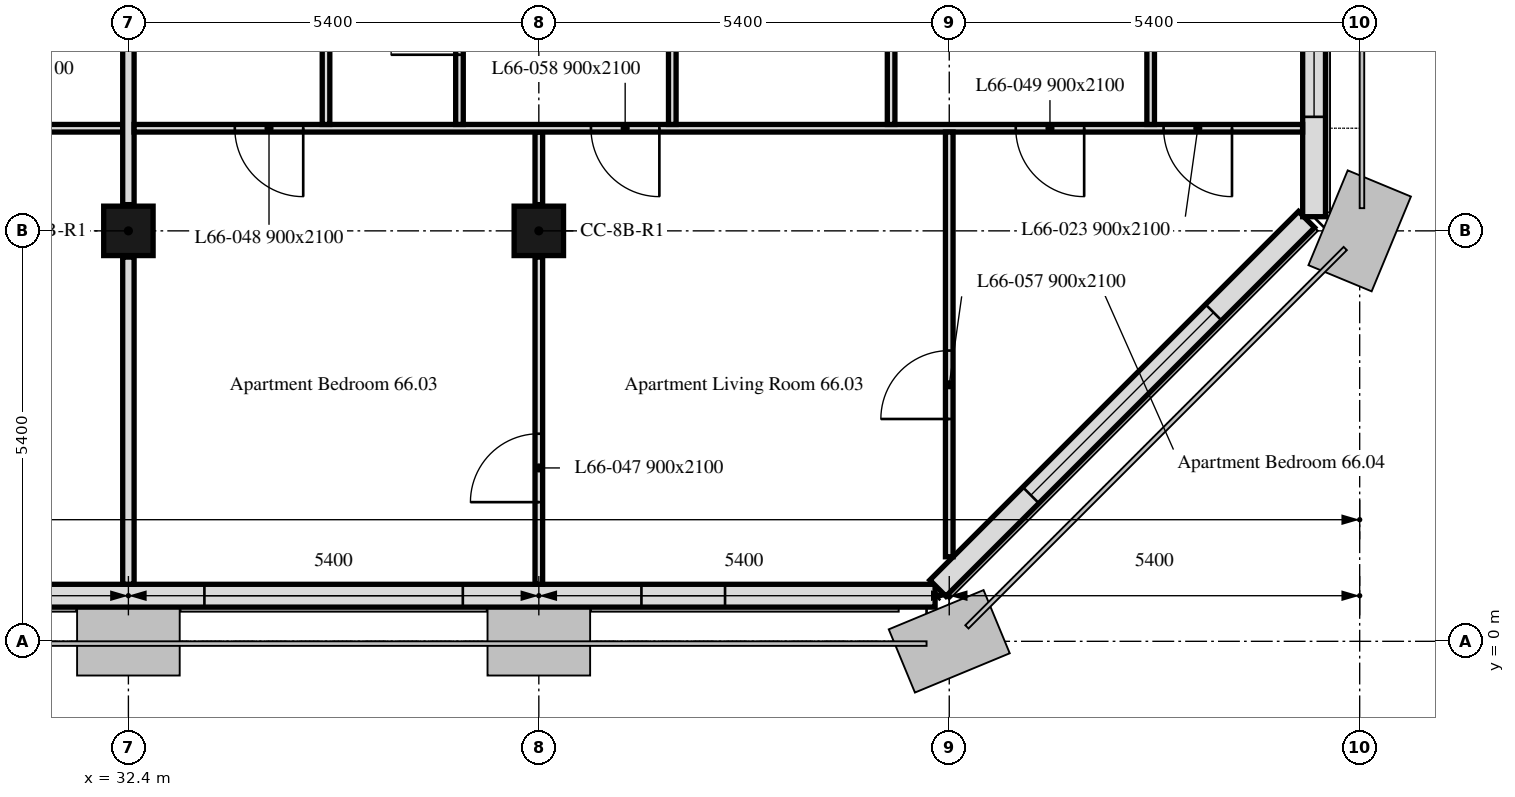
"""IFC4 building model, lengths in metres.
Left out: names, types, materials, properties, quantities, classifications, styles, units other than length and angle.
Written with IfcOpenShell. Run it as: python <this file> out.ifc"""

import sys

from ifc_helpers import new_model, si_unit, direction, frame, frame_2d, origin, origin_2d, place, context, subcontext, project, spatial, rectangle, extrude, element, fill, save


model = new_model("IFC4")
c1 = context("Model", 3, precision=1e-05, world=origin(), true_north=direction((0.0, 1.0)))
c2 = subcontext(c1, "Body", "Model", "MODEL_VIEW")
j1 = project(units=[si_unit("LENGTHUNIT", "METRE"), si_unit("PLANEANGLEUNIT", "RADIAN")], contexts=[c1])
p1 = place(None, origin())
s1 = spatial("IfcSite", under=j1, at=p1, CompositionType="ELEMENT")
p2 = place(p1, origin())
s2 = spatial("IfcBuilding", under=s1, at=p2, CompositionType="ELEMENT")
p3 = place(p2, frame((0.0, 0.0, 271.9)))
s3 = spatial("IfcBuildingStorey", under=s2, at=p3, CompositionType="ELEMENT", Elevation=271.9)
for number, where, z_axis, x_axis in (
    (1, (32.4, 5.4, 0.0), (0.0, 0.0, 1.0), (1.0, 0.0, 0.0)),
    (2, (37.8, 5.4, 0.0), (0.0, 0.0, 1.0), (1.0, 0.0, 0.0)),
):
    element("IfcColumn", number, at=place(p3, frame(where, z_axis=z_axis, x_axis=x_axis)), inside=s3, PredefinedType="COLUMN", context=c2, shape_type="SweptSolid", body=[
        extrude(rectangle(XDim=0.65, YDim=0.65, at=origin_2d()), origin(), (0.0, 0.0, 1.0), 3.0),
    ])
p4 = place(p3, frame((10.986, 0.6, 0.0), z_axis=(0.0, 0.0, 1.0), x_axis=(1.0, 0.0, 0.0)))
e3 = element("IfcWall", 3, at=p4, inside=s3, PredefinedType="SOLIDWALL", context=c2, shape_type="SweptSolid", body=[
    extrude(rectangle(XDim=32.027, YDim=0.3, at=frame_2d((16.014, 0.0))), origin(), (0.0, 0.0, 1.0), 3.0),
])
p5 = place(p4, frame((0.814, 0.0, 0.9)))
e4 = element("IfcOpeningElement", 4, at=p5, cuts=e3, PredefinedType="OPENING", context=c2, shape_type="SweptSolid", body=[
    extrude(rectangle(XDim=3.4, YDim=1.7, at=frame_2d((1.7, 0.85))), frame((0.0, 0.16, 0.0), z_axis=(0.0, -1.0, 0.0), x_axis=(1.0, 0.0, 0.0)), (0.0, 0.0, 1.0), 0.32),
])
p6 = place(p4, frame((6.564, 0.0, 0.9)))
e5 = element("IfcOpeningElement", 5, at=p6, cuts=e3, PredefinedType="OPENING", context=c2, shape_type="SweptSolid", body=[
    extrude(rectangle(XDim=1.1, YDim=1.7, at=frame_2d((0.55, 0.85))), frame((0.0, 0.16, 0.0), z_axis=(0.0, -1.0, 0.0), x_axis=(1.0, 0.0, 0.0)), (0.0, 0.0, 1.0), 0.32),
])
p7 = place(p4, frame((11.614, 0.0, 0.9)))
e6 = element("IfcOpeningElement", 6, at=p7, cuts=e3, PredefinedType="OPENING", context=c2, shape_type="SweptSolid", body=[
    extrude(rectangle(XDim=3.4, YDim=1.7, at=frame_2d((1.7, 0.85))), frame((0.0, 0.16, 0.0), z_axis=(0.0, -1.0, 0.0), x_axis=(1.0, 0.0, 0.0)), (0.0, 0.0, 1.0), 0.32),
])
p8 = place(p4, frame((17.364, 0.0, 0.9)))
e7 = element("IfcOpeningElement", 7, at=p8, cuts=e3, PredefinedType="OPENING", context=c2, shape_type="SweptSolid", body=[
    extrude(rectangle(XDim=1.1, YDim=1.7, at=frame_2d((0.55, 0.85))), frame((0.0, 0.16, 0.0), z_axis=(0.0, -1.0, 0.0), x_axis=(1.0, 0.0, 0.0)), (0.0, 0.0, 1.0), 0.32),
])
p9 = place(p4, frame((22.414, 0.0, 0.9)))
e8 = element("IfcOpeningElement", 8, at=p9, cuts=e3, PredefinedType="OPENING", context=c2, shape_type="SweptSolid", body=[
    extrude(rectangle(XDim=3.4, YDim=1.7, at=frame_2d((1.7, 0.85))), frame((0.0, 0.16, 0.0), z_axis=(0.0, -1.0, 0.0), x_axis=(1.0, 0.0, 0.0)), (0.0, 0.0, 1.0), 0.32),
])
p10 = place(p4, frame((28.164, 0.0, 0.9)))
e9 = element("IfcOpeningElement", 9, at=p10, cuts=e3, PredefinedType="OPENING", context=c2, shape_type="SweptSolid", body=[
    extrude(rectangle(XDim=1.1, YDim=1.7, at=frame_2d((0.55, 0.85))), frame((0.0, 0.16, 0.0), z_axis=(0.0, -1.0, 0.0), x_axis=(1.0, 0.0, 0.0)), (0.0, 0.0, 1.0), 0.32),
])
p11 = place(p3, frame((43.051, 0.699, 0.0), z_axis=(0.0, 0.0, 1.0), x_axis=(0.707106781187, 0.707106781187, 0.0)))
e10 = element("IfcWall", 10, at=p11, inside=s3, PredefinedType="SOLIDWALL", context=c2, shape_type="SweptSolid", body=[
    extrude(rectangle(XDim=6.86, YDim=0.3, at=frame_2d((3.43, 0.0))), origin(), (0.0, 0.0, 1.0), 3.0),
])
p12 = place(p11, frame((1.73, 0.0, 0.9)))
e11 = element("IfcOpeningElement", 11, at=p12, cuts=e10, PredefinedType="OPENING", context=c2, shape_type="SweptSolid", body=[
    extrude(rectangle(XDim=3.4, YDim=1.7, at=frame_2d((1.7, 0.85))), frame((0.0, 0.16, 0.0), z_axis=(0.0, -1.0, 0.0), x_axis=(1.0, 0.0, 0.0)), (0.0, 0.0, 1.0), 0.32),
])
p13 = place(p3, frame((48.0, 5.586, 0.0), z_axis=(0.0, 0.0, 1.0), x_axis=(0.0, 1.0, 0.0)))
e12 = element("IfcWall", 12, at=p13, inside=s3, PredefinedType="SOLIDWALL", context=c2, shape_type="SweptSolid", body=[
    extrude(rectangle(XDim=32.027, YDim=0.3, at=frame_2d((16.014, 0.0))), origin(), (0.0, 0.0, 1.0), 3.0),
])
p14 = place(p13, frame((1.314, 0.0, 0.9)))
e13 = element("IfcOpeningElement", 13, at=p14, cuts=e12, PredefinedType="OPENING", context=c2, shape_type="SweptSolid", body=[
    extrude(rectangle(XDim=1.1, YDim=1.7, at=frame_2d((0.55, 0.85))), frame((0.0, 0.16, 0.0), z_axis=(0.0, -1.0, 0.0), x_axis=(1.0, 0.0, 0.0)), (0.0, 0.0, 1.0), 0.32),
])
p15 = place(p13, frame((2.764, 0.0, 0.9)))
e14 = element("IfcOpeningElement", 14, at=p15, cuts=e12, PredefinedType="OPENING", context=c2, shape_type="SweptSolid", body=[
    extrude(rectangle(XDim=1.1, YDim=1.7, at=frame_2d((0.55, 0.85))), frame((0.0, 0.16, 0.0), z_axis=(0.0, -1.0, 0.0), x_axis=(1.0, 0.0, 0.0)), (0.0, 0.0, 1.0), 0.32),
])
p16 = place(p13, frame((6.564, 0.0, 0.9)))
e15 = element("IfcOpeningElement", 15, at=p16, cuts=e12, PredefinedType="OPENING", context=c2, shape_type="SweptSolid", body=[
    extrude(rectangle(XDim=1.1, YDim=1.7, at=frame_2d((0.55, 0.85))), frame((0.0, 0.16, 0.0), z_axis=(0.0, -1.0, 0.0), x_axis=(1.0, 0.0, 0.0)), (0.0, 0.0, 1.0), 0.32),
])
p17 = place(p13, frame((8.514, 0.0, 0.9)))
e16 = element("IfcOpeningElement", 16, at=p17, cuts=e12, PredefinedType="OPENING", context=c2, shape_type="SweptSolid", body=[
    extrude(rectangle(XDim=1.1, YDim=1.7, at=frame_2d((0.55, 0.85))), frame((0.0, 0.16, 0.0), z_axis=(0.0, -1.0, 0.0), x_axis=(1.0, 0.0, 0.0)), (0.0, 0.0, 1.0), 0.32),
])
p18 = place(p13, frame((11.614, 0.0, 0.9)))
e17 = element("IfcOpeningElement", 17, at=p18, cuts=e12, PredefinedType="OPENING", context=c2, shape_type="SweptSolid", body=[
    extrude(rectangle(XDim=3.4, YDim=1.7, at=frame_2d((1.7, 0.85))), frame((0.0, 0.16, 0.0), z_axis=(0.0, -1.0, 0.0), x_axis=(1.0, 0.0, 0.0)), (0.0, 0.0, 1.0), 0.32),
])
p19 = place(p13, frame((17.364, 0.0, 0.9)))
e18 = element("IfcOpeningElement", 18, at=p19, cuts=e12, PredefinedType="OPENING", context=c2, shape_type="SweptSolid", body=[
    extrude(rectangle(XDim=1.1, YDim=1.7, at=frame_2d((0.55, 0.85))), frame((0.0, 0.16, 0.0), z_axis=(0.0, -1.0, 0.0), x_axis=(1.0, 0.0, 0.0)), (0.0, 0.0, 1.0), 0.32),
])
p20 = place(p13, frame((18.964, 0.0, 0.9)))
e19 = element("IfcOpeningElement", 19, at=p20, cuts=e12, PredefinedType="OPENING", context=c2, shape_type="SweptSolid", body=[
    extrude(rectangle(XDim=1.1, YDim=1.7, at=frame_2d((0.55, 0.85))), frame((0.0, 0.16, 0.0), z_axis=(0.0, -1.0, 0.0), x_axis=(1.0, 0.0, 0.0)), (0.0, 0.0, 1.0), 0.32),
])
p21 = place(p13, frame((22.414, 0.0, 0.9)))
e20 = element("IfcOpeningElement", 20, at=p21, cuts=e12, PredefinedType="OPENING", context=c2, shape_type="SweptSolid", body=[
    extrude(rectangle(XDim=3.4, YDim=1.7, at=frame_2d((1.7, 0.85))), frame((0.0, 0.16, 0.0), z_axis=(0.0, -1.0, 0.0), x_axis=(1.0, 0.0, 0.0)), (0.0, 0.0, 1.0), 0.32),
])
p22 = place(p13, frame((28.239, 0.0, 0.9)))
e21 = element("IfcOpeningElement", 21, at=p22, cuts=e12, PredefinedType="OPENING", context=c2, shape_type="SweptSolid", body=[
    extrude(rectangle(XDim=0.65, YDim=1.7, at=frame_2d((0.325, 0.85))), frame((0.0, 0.16, 0.0), z_axis=(0.0, -1.0, 0.0), x_axis=(1.0, 0.0, 0.0)), (0.0, 0.0, 1.0), 0.32),
])
p23 = place(p13, frame((29.764, 0.0, 0.9)))
e22 = element("IfcOpeningElement", 22, at=p23, cuts=e12, PredefinedType="OPENING", context=c2, shape_type="SweptSolid", body=[
    extrude(rectangle(XDim=1.1, YDim=1.7, at=frame_2d((0.55, 0.85))), frame((0.0, 0.16, 0.0), z_axis=(0.0, -1.0, 0.0), x_axis=(1.0, 0.0, 0.0)), (0.0, 0.0, 1.0), 0.32),
])
p24 = place(p3, frame((32.4, 0.751, 0.0), z_axis=(0.0, 0.0, 1.0), x_axis=(0.0, 1.0, 0.0)))
e23 = element("IfcWall", 23, at=p24, inside=s3, PredefinedType="PARTITIONING", context=c2, shape_type="SweptSolid", body=[
    extrude(rectangle(XDim=4.304, YDim=0.15, at=frame_2d((2.152, 0.0))), origin(), (0.0, 0.0, 1.0), 2.4),
])
p25 = place(p3, frame((32.325, 6.75, 0.0), z_axis=(0.0, 0.0, 1.0), x_axis=(-1.0, 0.0, 0.0)))
e24 = element("IfcWall", 24, at=p25, inside=s3, PredefinedType="PARTITIONING", context=c2, shape_type="SweptSolid", body=[
    extrude(rectangle(XDim=5.355, YDim=0.1, at=frame_2d((2.677, 0.0))), origin(), (0.0, 0.0, 1.0), 3.0),
])
p26 = place(p25, frame((1.949, 0.0, 0.0)))
e25 = element("IfcOpeningElement", 25, at=p26, cuts=e24, PredefinedType="OPENING", context=c2, shape_type="SweptSolid", body=[
    extrude(rectangle(XDim=0.9, YDim=2.1, at=frame_2d((0.45, 1.05))), frame((0.0, 0.05, 0.0), z_axis=(0.0, -1.0, 0.0), x_axis=(1.0, 0.0, 0.0)), (0.0, 0.0, 1.0), 0.1),
])
p27 = place(p3, frame((32.4, 5.745, 0.0), z_axis=(0.0, 0.0, 1.0), x_axis=(0.0, 1.0, 0.0)))
e26 = element("IfcWall", 26, at=p27, inside=s3, PredefinedType="PARTITIONING", context=c2, shape_type="SweptSolid", body=[
    extrude(rectangle(XDim=4.71, YDim=0.15, at=frame_2d((2.355, 0.0))), origin(), (0.0, 0.0, 1.0), 2.4),
])
p28 = place(p3, frame((37.8, 0.751, 0.0), z_axis=(0.0, 0.0, 1.0), x_axis=(0.0, 1.0, 0.0)))
e27 = element("IfcWall", 27, at=p28, inside=s3, PredefinedType="PARTITIONING", context=c2, shape_type="SweptSolid", body=[
    extrude(rectangle(XDim=4.304, YDim=0.1, at=frame_2d((2.152, 0.0))), origin(), (0.0, 0.0, 1.0), 2.4),
])
p29 = place(p28, frame((1.08, 0.0, 0.0)))
e28 = element("IfcOpeningElement", 28, at=p29, cuts=e27, PredefinedType="OPENING", context=c2, shape_type="SweptSolid", body=[
    extrude(rectangle(XDim=0.9, YDim=2.1, at=frame_2d((0.45, 1.05))), frame((0.0, 0.05, 0.0), z_axis=(0.0, -1.0, 0.0), x_axis=(1.0, 0.0, 0.0)), (0.0, 0.0, 1.0), 0.1),
])
p30 = place(p3, frame((37.8, 5.745, 0.0), z_axis=(0.0, 0.0, 1.0), x_axis=(0.0, 1.0, 0.0)))
e29 = element("IfcWall", 29, at=p30, inside=s3, PredefinedType="PARTITIONING", context=c2, shape_type="SweptSolid", body=[
    extrude(rectangle(XDim=0.955, YDim=0.1, at=frame_2d((0.478, 0.0))), origin(), (0.0, 0.0, 1.0), 2.4),
])
p31 = place(p3, frame((47.849, 6.75, 0.0), z_axis=(0.0, 0.0, 1.0), x_axis=(-1.0, 0.0, 0.0)))
e30 = element("IfcWall", 30, at=p31, inside=s3, PredefinedType="PARTITIONING", context=c2, shape_type="SweptSolid", body=[
    extrude(rectangle(XDim=15.374, YDim=0.1, at=frame_2d((7.687, 0.0))), origin(), (0.0, 0.0, 1.0), 2.4),
])
p32 = place(p31, frame((0.929, 0.0, 0.0)))
e31 = element("IfcOpeningElement", 31, at=p32, cuts=e30, PredefinedType="OPENING", context=c2, shape_type="SweptSolid", body=[
    extrude(rectangle(XDim=0.9, YDim=2.1, at=frame_2d((0.45, 1.05))), frame((0.0, 0.05, 0.0), z_axis=(0.0, -1.0, 0.0), x_axis=(1.0, 0.0, 0.0)), (0.0, 0.0, 1.0), 0.1),
])
p33 = place(p31, frame((13.149, 0.0, 0.0)))
e32 = element("IfcOpeningElement", 32, at=p33, cuts=e30, PredefinedType="OPENING", context=c2, shape_type="SweptSolid", body=[
    extrude(rectangle(XDim=0.9, YDim=2.1, at=frame_2d((0.45, 1.05))), frame((0.0, 0.05, 0.0), z_axis=(0.0, -1.0, 0.0), x_axis=(1.0, 0.0, 0.0)), (0.0, 0.0, 1.0), 0.1),
])
p34 = place(p31, frame((2.874, 0.0, 0.0)))
e33 = element("IfcOpeningElement", 33, at=p34, cuts=e30, PredefinedType="OPENING", context=c2, shape_type="SweptSolid", body=[
    extrude(rectangle(XDim=0.9, YDim=2.1, at=frame_2d((0.45, 1.05))), frame((0.0, 0.05, 0.0), z_axis=(0.0, -1.0, 0.0), x_axis=(1.0, 0.0, 0.0)), (0.0, 0.0, 1.0), 0.1),
])
p35 = place(p31, frame((8.463, 0.0, 0.0)))
e34 = element("IfcOpeningElement", 34, at=p35, cuts=e30, PredefinedType="OPENING", context=c2, shape_type="SweptSolid", body=[
    extrude(rectangle(XDim=0.9, YDim=2.1, at=frame_2d((0.45, 1.05))), frame((0.0, 0.05, 0.0), z_axis=(0.0, -1.0, 0.0), x_axis=(1.0, 0.0, 0.0)), (0.0, 0.0, 1.0), 0.1),
])
p36 = place(p3, frame((43.2, 1.112, 0.0), z_axis=(0.0, 0.0, 1.0), x_axis=(0.0, 1.0, 0.0)))
e35 = element("IfcWall", 35, at=p36, inside=s3, PredefinedType="PARTITIONING", context=c2, shape_type="SweptSolid", body=[
    extrude(rectangle(XDim=5.588, YDim=0.1, at=frame_2d((2.794, 0.0))), origin(), (0.0, 0.0, 1.0), 3.0),
])
p37 = place(p36, frame((1.813, 0.0, 0.0)))
e36 = element("IfcOpeningElement", 36, at=p37, cuts=e35, PredefinedType="OPENING", context=c2, shape_type="SweptSolid", body=[
    extrude(rectangle(XDim=0.9, YDim=2.1, at=frame_2d((0.45, 1.05))), frame((0.0, 0.05, 0.0), z_axis=(0.0, -1.0, 0.0), x_axis=(1.0, 0.0, 0.0)), (0.0, 0.0, 1.0), 0.1),
])
p38 = place(p3, frame((35.0, 6.8, 0.0), z_axis=(0.0, 0.0, 1.0), x_axis=(0.0, 1.0, 0.0)))
e37 = element("IfcWall", 37, at=p38, inside=s3, PredefinedType="PARTITIONING", context=c2, shape_type="SweptSolid", body=[
    extrude(rectangle(XDim=7.075, YDim=0.1, at=frame_2d((3.538, 0.0))), origin(), (0.0, 0.0, 1.0), 2.4),
])
p39 = place(p3, frame((36.756, 6.8, 0.0), z_axis=(0.0, 0.0, 1.0), x_axis=(0.0, 1.0, 0.0)))
e38 = element("IfcWall", 38, at=p39, inside=s3, PredefinedType="PARTITIONING", context=c2, shape_type="SweptSolid", body=[
    extrude(rectangle(XDim=7.075, YDim=0.1, at=frame_2d((3.538, 0.0))), origin(), (0.0, 0.0, 1.0), 2.4),
])
p40 = place(p39, frame((0.917, 0.0, 0.0)))
e39 = element("IfcOpeningElement", 39, at=p40, cuts=e38, PredefinedType="OPENING", context=c2, shape_type="SweptSolid", body=[
    extrude(rectangle(XDim=0.9, YDim=2.1, at=frame_2d((0.45, 1.05))), frame((0.0, 0.05, 0.0), z_axis=(0.0, -1.0, 0.0), x_axis=(1.0, 0.0, 0.0)), (0.0, 0.0, 1.0), 0.1),
])
p41 = place(p39, frame((5.925, 0.0, 0.0)))
e40 = element("IfcOpeningElement", 40, at=p41, cuts=e38, PredefinedType="OPENING", context=c2, shape_type="SweptSolid", body=[
    extrude(rectangle(XDim=0.9, YDim=2.1, at=frame_2d((0.45, 1.05))), frame((0.0, 0.05, 0.0), z_axis=(0.0, -1.0, 0.0), x_axis=(1.0, 0.0, 0.0)), (0.0, 0.0, 1.0), 0.1),
])
p42 = place(p3, frame((39.556, 6.8, 0.0), z_axis=(0.0, 0.0, 1.0), x_axis=(0.0, 1.0, 0.0)))
e41 = element("IfcWall", 41, at=p42, inside=s3, PredefinedType="PARTITIONING", context=c2, shape_type="SweptSolid", body=[
    extrude(rectangle(XDim=7.075, YDim=0.1, at=frame_2d((3.538, 0.0))), origin(), (0.0, 0.0, 1.0), 2.4),
])
p43 = place(p42, frame((1.05, 0.0, 0.0)))
e42 = element("IfcOpeningElement", 42, at=p43, cuts=e41, PredefinedType="OPENING", context=c2, shape_type="SweptSolid", body=[
    extrude(rectangle(XDim=0.9, YDim=2.1, at=frame_2d((0.45, 1.05))), frame((0.0, 0.05, 0.0), z_axis=(0.0, -1.0, 0.0), x_axis=(1.0, 0.0, 0.0)), (0.0, 0.0, 1.0), 0.1),
])
p44 = place(p42, frame((5.925, 0.0, 0.0)))
e43 = element("IfcOpeningElement", 43, at=p44, cuts=e41, PredefinedType="OPENING", context=c2, shape_type="SweptSolid", body=[
    extrude(rectangle(XDim=0.9, YDim=2.1, at=frame_2d((0.45, 1.05))), frame((0.0, 0.05, 0.0), z_axis=(0.0, -1.0, 0.0), x_axis=(1.0, 0.0, 0.0)), (0.0, 0.0, 1.0), 0.1),
])
for number, where, z_axis, x_axis in (
    (44, (42.435, 6.8, 0.0), (0.0, 0.0, 1.0), (0.0, 1.0, 0.0)),
    (45, (45.85, 6.8, 0.0), (0.0, 0.0, 1.0), (0.0, 1.0, 0.0)),
):
    element("IfcWall", number, at=place(p3, frame(where, z_axis=z_axis, x_axis=x_axis)), inside=s3, PredefinedType="PARTITIONING", context=c2, shape_type="SweptSolid", body=[
        extrude(rectangle(XDim=7.075, YDim=0.1, at=frame_2d((3.538, 0.0))), origin(), (0.0, 0.0, 1.0), 2.4),
    ])
p45 = place(p9, origin())
e46 = element("IfcWindow", 46, at=p45, inside=s3, PartitioningType="SINGLE_PANEL", PredefinedType="WINDOW", context=c2, shape_type="SweptSolid", body=[
    extrude(rectangle(XDim=3.4, YDim=1.7, at=frame_2d((1.7, 0.85))), frame((0.0, 0.03, 0.0), z_axis=(0.0, -1.0, 0.0), x_axis=(1.0, 0.0, 0.0)), (0.0, 0.0, 1.0), 0.06),
])
fill(e8, e46)
p46 = place(p10, origin())
e47 = element("IfcWindow", 47, at=p46, inside=s3, PartitioningType="SINGLE_PANEL", PredefinedType="WINDOW", context=c2, shape_type="SweptSolid", body=[
    extrude(rectangle(XDim=1.1, YDim=1.7, at=frame_2d((0.55, 0.85))), frame((0.0, 0.03, 0.0), z_axis=(0.0, -1.0, 0.0), x_axis=(1.0, 0.0, 0.0)), (0.0, 0.0, 1.0), 0.06),
])
fill(e9, e47)
p47 = place(p12, origin())
e48 = element("IfcWindow", 48, at=p47, inside=s3, PartitioningType="SINGLE_PANEL", PredefinedType="WINDOW", context=c2, shape_type="SweptSolid", body=[
    extrude(rectangle(XDim=3.4, YDim=1.7, at=frame_2d((1.7, 0.85))), frame((0.0, 0.03, 0.0), z_axis=(0.0, -1.0, 0.0), x_axis=(1.0, 0.0, 0.0)), (0.0, 0.0, 1.0), 0.06),
])
fill(e11, e48)
p48 = place(p14, origin())
e49 = element("IfcWindow", 49, at=p48, inside=s3, PartitioningType="SINGLE_PANEL", PredefinedType="WINDOW", context=c2, shape_type="SweptSolid", body=[
    extrude(rectangle(XDim=1.1, YDim=1.7, at=frame_2d((0.55, 0.85))), frame((0.0, 0.03, 0.0), z_axis=(0.0, -1.0, 0.0), x_axis=(1.0, 0.0, 0.0)), (0.0, 0.0, 1.0), 0.06),
])
fill(e13, e49)
p49 = place(p32, origin())
e50 = element("IfcDoor", 50, at=p49, inside=s3, OperationType="SINGLE_SWING_LEFT", PredefinedType="DOOR", context=c2, shape_type="SweptSolid", body=[
    extrude(rectangle(XDim=0.9, YDim=2.1, at=frame_2d((0.45, 1.05))), frame((0.0, 0.025, 0.0), z_axis=(0.0, -1.0, 0.0), x_axis=(1.0, 0.0, 0.0)), (0.0, 0.0, 1.0), 0.05),
])
fill(e31, e50)
p50 = place(p40, origin())
e51 = element("IfcDoor", 51, at=p50, inside=s3, OperationType="SINGLE_SWING_RIGHT", PredefinedType="DOOR", context=c2, shape_type="SweptSolid", body=[
    extrude(rectangle(XDim=0.9, YDim=2.1, at=frame_2d((0.45, 1.05))), frame((0.0, 0.025, 0.0), z_axis=(0.0, -1.0, 0.0), x_axis=(1.0, 0.0, 0.0)), (0.0, 0.0, 1.0), 0.05),
])
fill(e39, e51)
p51 = place(p29, origin())
e52 = element("IfcDoor", 52, at=p51, inside=s3, OperationType="SINGLE_SWING_RIGHT", PredefinedType="DOOR", context=c2, shape_type="SweptSolid", body=[
    extrude(rectangle(XDim=0.9, YDim=2.1, at=frame_2d((0.45, 1.05))), frame((0.0, 0.025, 0.0), z_axis=(0.0, -1.0, 0.0), x_axis=(1.0, 0.0, 0.0)), (0.0, 0.0, 1.0), 0.05),
])
fill(e28, e52)
p52 = place(p33, origin())
e53 = element("IfcDoor", 53, at=p52, inside=s3, OperationType="SINGLE_SWING_LEFT", PredefinedType="DOOR", context=c2, shape_type="SweptSolid", body=[
    extrude(rectangle(XDim=0.9, YDim=2.1, at=frame_2d((0.45, 1.05))), frame((0.0, 0.025, 0.0), z_axis=(0.0, -1.0, 0.0), x_axis=(1.0, 0.0, 0.0)), (0.0, 0.0, 1.0), 0.05),
])
fill(e32, e53)
p53 = place(p34, origin())
e54 = element("IfcDoor", 54, at=p53, inside=s3, OperationType="SINGLE_SWING_RIGHT", PredefinedType="DOOR", context=c2, shape_type="SweptSolid", body=[
    extrude(rectangle(XDim=0.9, YDim=2.1, at=frame_2d((0.45, 1.05))), frame((0.0, 0.025, 0.0), z_axis=(0.0, -1.0, 0.0), x_axis=(1.0, 0.0, 0.0)), (0.0, 0.0, 1.0), 0.05),
])
fill(e33, e54)
p54 = place(p37, origin())
e55 = element("IfcDoor", 55, at=p54, inside=s3, OperationType="SINGLE_SWING_LEFT", PredefinedType="DOOR", context=c2, shape_type="SweptSolid", body=[
    extrude(rectangle(XDim=0.9, YDim=2.1, at=frame_2d((0.45, 1.05))), frame((0.0, 0.025, 0.0), z_axis=(0.0, -1.0, 0.0), x_axis=(1.0, 0.0, 0.0)), (0.0, 0.0, 1.0), 0.05),
])
fill(e36, e55)
p55 = place(p35, origin())
e56 = element("IfcDoor", 56, at=p55, inside=s3, OperationType="SINGLE_SWING_LEFT", PredefinedType="DOOR", context=c2, shape_type="SweptSolid", body=[
    extrude(rectangle(XDim=0.9, YDim=2.1, at=frame_2d((0.45, 1.05))), frame((0.0, 0.025, 0.0), z_axis=(0.0, -1.0, 0.0), x_axis=(1.0, 0.0, 0.0)), (0.0, 0.0, 1.0), 0.05),
])
fill(e34, e56)
save(model, sys.argv[1])
